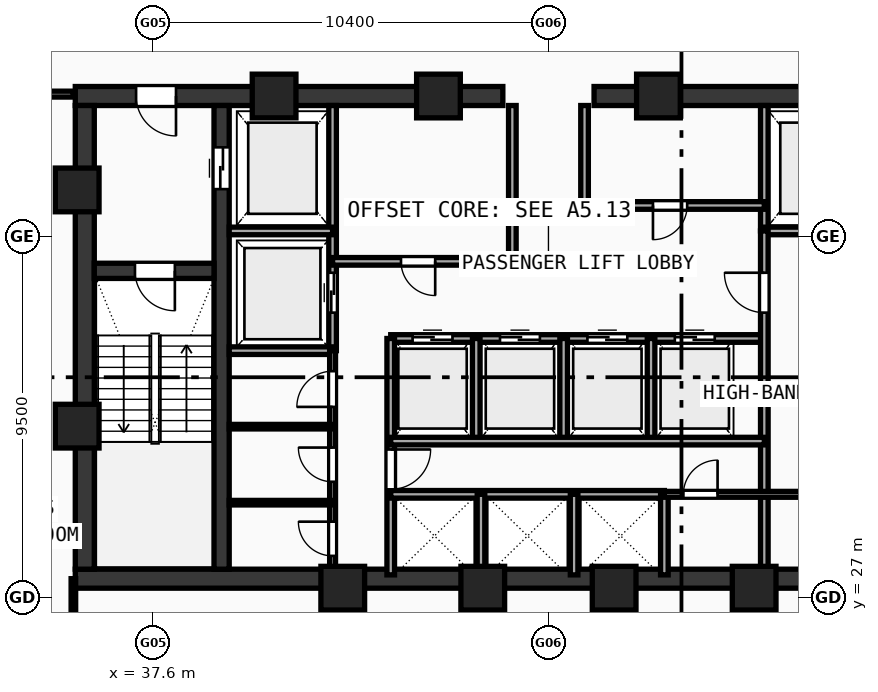
"""IFC4 building model, lengths in metres.
Left out: names, types, materials, properties, quantities, classifications, styles, units other than length and angle.
Written with IfcOpenShell. Run it as: python <this file> out.ifc"""

import sys

from ifc_helpers import new_model, si_unit, direction, frame, frame_2d, origin, origin_with_axes, origin_2d, place, context, subcontext, project, spatial, rectangle, hollow_rectangle, extrude, source, transform, mapped, element, fill, save


model = new_model("IFC4")
c1 = context("Model", 3, precision=1e-05, world=origin(), true_north=direction((0.0, 1.0)))
c2 = subcontext(c1, "Body", "Model", "MODEL_VIEW")
j1 = project(units=[si_unit("LENGTHUNIT", "METRE"), si_unit("PLANEANGLEUNIT", "RADIAN")], contexts=[c1])
p1 = place(None, origin())
s1 = spatial("IfcSite", under=j1, at=p1, CompositionType="ELEMENT")
p2 = place(p1, origin())
s2 = spatial("IfcBuilding", under=s1, at=p2, CompositionType="ELEMENT")
p3 = place(p2, frame((0.0, 0.0, 192.36)))
s3 = spatial("IfcBuildingStorey", under=s2, at=p3, CompositionType="ELEMENT", Elevation=192.36)
p4 = place(p3, frame((35.55, 27.5, 0.0), z_axis=(0.0, 0.0, 1.0), x_axis=(1.0, 0.0, 0.0)))
e1 = element("IfcWall", 1, at=p4, inside=s3, PredefinedType="SHEAR", context=c2, shape_type="SweptSolid", body=[
    extrude(rectangle(XDim=24.9, YDim=0.5, at=frame_2d((12.45, 0.0))), origin(), (0.0, 0.0, 1.0), 3.54),
])
p5 = place(p3, frame((35.55, 40.2, 0.0), z_axis=(0.0, 0.0, 1.0), x_axis=(1.0, 0.0, 0.0)))
e2 = element("IfcWall", 2, at=p5, inside=s3, PredefinedType="SHEAR", context=c2, shape_type="SweptSolid", body=[
    extrude(rectangle(XDim=11.25, YDim=0.5, at=frame_2d((5.625, 0.0))), origin(), (0.0, 0.0, 1.0), 3.54),
])
p6 = place(p5, frame((1.6, 0.0, 0.0)))
e3 = element("IfcOpeningElement", 3, at=p6, cuts=e2, PredefinedType="OPENING", context=c2, shape_type="SweptSolid", body=[
    extrude(rectangle(XDim=1.05, YDim=2.1, at=frame_2d((0.525, 1.05))), frame((0.0, 0.26, 0.0), z_axis=(0.0, -1.0, 0.0), x_axis=(1.0, 0.0, 0.0)), (0.0, 0.0, 1.0), 0.52),
])
p7 = place(p3, frame((49.2, 40.2, 0.0), z_axis=(0.0, 0.0, 1.0), x_axis=(1.0, 0.0, 0.0)))
e4 = element("IfcWall", 4, at=p7, inside=s3, PredefinedType="SHEAR", context=c2, shape_type="SweptSolid", body=[
    extrude(rectangle(XDim=11.25, YDim=0.5, at=frame_2d((5.625, 0.0))), origin(), (0.0, 0.0, 1.0), 3.54),
])
p8 = place(p7, frame((8.6, 0.0, 0.0)))
e5 = element("IfcOpeningElement", 5, at=p8, cuts=e4, PredefinedType="OPENING", context=c2, shape_type="SweptSolid", body=[
    extrude(rectangle(XDim=1.05, YDim=2.1, at=frame_2d((0.525, 1.05))), frame((0.0, 0.26, 0.0), z_axis=(0.0, -1.0, 0.0), x_axis=(1.0, 0.0, 0.0)), (0.0, 0.0, 1.0), 0.52),
])
p9 = place(p3, frame((35.8, 27.75, 0.0), z_axis=(0.0, 0.0, 1.0), x_axis=(0.0, 1.0, 0.0)))
e6 = element("IfcWall", 6, at=p9, inside=s3, PredefinedType="SHEAR", context=c2, shape_type="SweptSolid", body=[
    extrude(rectangle(XDim=12.2, YDim=0.5, at=frame_2d((6.1, 0.0))), origin(), (0.0, 0.0, 1.0), 3.54),
])
p10 = place(p3, frame((39.4, 27.75, 0.0), z_axis=(0.0, 0.0, 1.0), x_axis=(0.0, 1.0, 0.0)))
e7 = element("IfcWall", 7, at=p10, inside=s3, PredefinedType="SHEAR", context=c2, shape_type="SweptSolid", body=[
    extrude(rectangle(XDim=12.2, YDim=0.4, at=frame_2d((6.1, 0.0))), origin(), (0.0, 0.0, 1.0), 3.54),
])
p11 = place(p10, frame((10.0, 0.0, 0.0)))
e8 = element("IfcOpeningElement", 8, at=p11, cuts=e7, PredefinedType="OPENING", context=c2, shape_type="SweptSolid", body=[
    extrude(rectangle(XDim=1.1, YDim=2.1, at=frame_2d((0.55, 1.05))), frame((0.0, 0.21, 0.0), z_axis=(0.0, -1.0, 0.0), x_axis=(1.0, 0.0, 0.0)), (0.0, 0.0, 1.0), 0.42),
])
p12 = place(p3, frame((36.05, 35.6, 0.0), z_axis=(0.0, 0.0, 1.0), x_axis=(1.0, 0.0, 0.0)))
e9 = element("IfcWall", 9, at=p12, inside=s3, PredefinedType="SHEAR", context=c2, shape_type="SweptSolid", body=[
    extrude(rectangle(XDim=3.15, YDim=0.4, at=frame_2d((1.575, 0.0))), origin(), (0.0, 0.0, 1.0), 3.54),
])
p13 = place(p12, frame((1.07, 0.0, 0.0)))
e10 = element("IfcOpeningElement", 10, at=p13, cuts=e9, PredefinedType="OPENING", context=c2, shape_type="SweptSolid", body=[
    extrude(rectangle(XDim=1.05, YDim=2.1, at=frame_2d((0.525, 1.05))), frame((0.0, 0.21, 0.0), z_axis=(0.0, -1.0, 0.0), x_axis=(1.0, 0.0, 0.0)), (0.0, 0.0, 1.0), 0.42),
])
m1 = source(origin(), c2, "Body", "SweptSolid", [
    extrude(hollow_rectangle(XDim=1.15, YDim=1.15, WallThickness=0.048, at=origin_2d()), origin(), (0.0, 0.0, 1.0), 3.8),
])
for number, where, z_axis, x_axis in (
    (11, (42.588, 27.25, -0.26), (0.0, 0.0, 1.0), (1.0, 0.0, 0.0)),
    (12, (46.272, 27.25, -0.26), (0.0, 0.0, 1.0), (1.0, 0.0, 0.0)),
    (13, (49.729, 27.25, -0.26), (0.0, 0.0, 1.0), (1.0, 0.0, 0.0)),
    (14, (53.412, 27.25, -0.26), (0.0, 0.0, 1.0), (1.0, 0.0, 0.0)),
    (15, (50.894, 40.2, -0.26), (0.0, 0.0, 1.0), (1.0, 0.0, 0.0)),
    (16, (45.106, 40.2, -0.26), (0.0, 0.0, 1.0), (1.0, 0.0, 0.0)),
    (17, (40.781, 40.2, -0.26), (0.0, 0.0, 1.0), (1.0, 0.0, 0.0)),
    (18, (35.6, 37.729, -0.26), (0.0, 0.0, 1.0), (1.0, 0.0, 0.0)),
    (19, (35.6, 31.513, -0.26), (0.0, 0.0, 1.0), (1.0, 0.0, 0.0)),
):
    element("IfcColumn", number, at=place(p3, frame(where, z_axis=z_axis, x_axis=x_axis)), inside=s3, PredefinedType="COLUMN", context=c2, shape_type="MappedRepresentation", body=[
        mapped(m1, transform((0.0, 0.0, 0.0), scale=1.0)),
    ])
p14 = place(p3, frame((42.32, 33.5, 0.0), z_axis=(0.0, 0.0, 1.0), x_axis=(0.0, 1.0, 0.0)))
e20 = element("IfcWall", 20, at=p14, inside=s3, PredefinedType="SOLIDWALL", context=c2, shape_type="SweptSolid", body=[
    extrude(rectangle(XDim=6.45, YDim=0.2, at=frame_2d((3.225, 0.0))), origin(), (0.0, 0.0, 1.0), 3.54),
])
p15 = place(p14, frame((1.0, 0.0, 0.0)))
e21 = element("IfcOpeningElement", 21, at=p15, cuts=e20, PredefinedType="OPENING", context=c2, shape_type="SweptSolid", body=[
    extrude(rectangle(XDim=1.05, YDim=2.1, at=frame_2d((0.525, 1.05))), frame((0.0, 0.11, 0.0), z_axis=(0.0, -1.0, 0.0), x_axis=(1.0, 0.0, 0.0)), (0.0, 0.0, 1.0), 0.22),
])
for number, where, z_axis, x_axis in (
    (22, (39.6, 36.65, 0.0), (0.0, 0.0, 1.0), (1.0, 0.0, 0.0)),
    (23, (39.6, 33.5, 0.0), (0.0, 0.0, 1.0), (1.0, 0.0, 0.0)),
):
    element("IfcWall", number, at=place(p3, frame(where, z_axis=z_axis, x_axis=x_axis)), inside=s3, PredefinedType="SOLIDWALL", context=c2, shape_type="SweptSolid", body=[
        extrude(rectangle(XDim=2.72, YDim=0.2, at=frame_2d((1.36, 0.0))), origin(), (0.0, 0.0, 1.0), 3.54),
    ])
p16 = place(p3, frame((53.68, 36.65, 0.0), z_axis=(0.0, 0.0, 1.0), x_axis=(0.0, 1.0, 0.0)))
e24 = element("IfcWall", 24, at=p16, inside=s3, PredefinedType="SOLIDWALL", context=c2, shape_type="SweptSolid", body=[
    extrude(rectangle(XDim=3.3, YDim=0.2, at=frame_2d((1.65, 0.0))), origin(), (0.0, 0.0, 1.0), 3.54),
])
p17 = place(p3, frame((53.68, 36.65, 0.0), z_axis=(0.0, 0.0, 1.0), x_axis=(1.0, 0.0, 0.0)))
e25 = element("IfcWall", 25, at=p17, inside=s3, PredefinedType="SOLIDWALL", context=c2, shape_type="SweptSolid", body=[
    extrude(rectangle(XDim=2.72, YDim=0.2, at=frame_2d((1.36, 0.0))), origin(), (0.0, 0.0, 1.0), 3.54),
])
p18 = place(p3, frame((42.32, 35.85, 0.0), z_axis=(0.0, 0.0, 1.0), x_axis=(1.0, 0.0, 0.0)))
e26 = element("IfcWall", 26, at=p18, inside=s3, PredefinedType="SOLIDWALL", context=c2, shape_type="SweptSolid", body=[
    extrude(rectangle(XDim=4.73, YDim=0.2, at=frame_2d((2.365, 0.0))), origin(), (0.0, 0.0, 1.0), 3.54),
])
p19 = place(p18, frame((1.8, 0.0, 0.0)))
e27 = element("IfcOpeningElement", 27, at=p19, cuts=e26, PredefinedType="OPENING", context=c2, shape_type="SweptSolid", body=[
    extrude(rectangle(XDim=0.9, YDim=2.1, at=frame_2d((0.45, 1.05))), frame((0.0, 0.11, 0.0), z_axis=(0.0, -1.0, 0.0), x_axis=(1.0, 0.0, 0.0)), (0.0, 0.0, 1.0), 0.22),
])
p20 = place(p3, frame((48.95, 37.32, 0.0), z_axis=(0.0, 0.0, 1.0), x_axis=(1.0, 0.0, 0.0)))
e28 = element("IfcWall", 28, at=p20, inside=s3, PredefinedType="SOLIDWALL", context=c2, shape_type="SweptSolid", body=[
    extrude(rectangle(XDim=4.73, YDim=0.2, at=frame_2d((2.365, 0.0))), origin(), (0.0, 0.0, 1.0), 3.54),
])
p21 = place(p20, frame((1.8, 0.0, 0.0)))
e29 = element("IfcOpeningElement", 29, at=p21, cuts=e28, PredefinedType="OPENING", context=c2, shape_type="SweptSolid", body=[
    extrude(rectangle(XDim=0.9, YDim=2.1, at=frame_2d((0.45, 1.05))), frame((0.0, 0.11, 0.0), z_axis=(0.0, -1.0, 0.0), x_axis=(1.0, 0.0, 0.0)), (0.0, 0.0, 1.0), 0.22),
])
p22 = place(p3, frame((47.05, 35.85, 0.0), z_axis=(0.0, 0.0, 1.0), x_axis=(0.0, 1.0, 0.0)))
e30 = element("IfcWall", 30, at=p22, inside=s3, PredefinedType="SOLIDWALL", context=c2, shape_type="SweptSolid", body=[
    extrude(rectangle(XDim=4.1, YDim=0.2, at=frame_2d((2.05, 0.0))), origin(), (0.0, 0.0, 1.0), 3.54),
])
p23 = place(p3, frame((48.95, 37.32, 0.0), z_axis=(0.0, 0.0, 1.0), x_axis=(0.0, 1.0, 0.0)))
e31 = element("IfcWall", 31, at=p23, inside=s3, PredefinedType="SOLIDWALL", context=c2, shape_type="SweptSolid", body=[
    extrude(rectangle(XDim=2.63, YDim=0.2, at=frame_2d((1.315, 0.0))), origin(), (0.0, 0.0, 1.0), 3.54),
])
p24 = place(p3, frame((43.85, 33.82, 0.0), z_axis=(0.0, 0.0, 1.0), x_axis=(1.0, 0.0, 0.0)))
e32 = element("IfcWall", 32, at=p24, inside=s3, PredefinedType="SOLIDWALL", context=c2, shape_type="SweptSolid", body=[
    extrude(rectangle(XDim=9.83, YDim=0.2, at=frame_2d((4.915, 0.0))), origin(), (0.0, 0.0, 1.0), 3.54),
])
p25 = place(p24, frame((0.575, 0.0, 0.0)))
e33 = element("IfcOpeningElement", 33, at=p25, cuts=e32, PredefinedType="OPENING", context=c2, shape_type="SweptSolid", body=[
    extrude(rectangle(XDim=1.05, YDim=2.1, at=frame_2d((0.525, 1.05))), frame((0.0, 0.11, 0.0), z_axis=(0.0, -1.0, 0.0), x_axis=(1.0, 0.0, 0.0)), (0.0, 0.0, 1.0), 0.22),
])
p26 = place(p24, frame((2.875, 0.0, 0.0)))
e34 = element("IfcOpeningElement", 34, at=p26, cuts=e32, PredefinedType="OPENING", context=c2, shape_type="SweptSolid", body=[
    extrude(rectangle(XDim=1.05, YDim=2.1, at=frame_2d((0.525, 1.05))), frame((0.0, 0.11, 0.0), z_axis=(0.0, -1.0, 0.0), x_axis=(1.0, 0.0, 0.0)), (0.0, 0.0, 1.0), 0.22),
])
p27 = place(p24, frame((5.175, 0.0, 0.0)))
e35 = element("IfcOpeningElement", 35, at=p27, cuts=e32, PredefinedType="OPENING", context=c2, shape_type="SweptSolid", body=[
    extrude(rectangle(XDim=1.05, YDim=2.1, at=frame_2d((0.525, 1.05))), frame((0.0, 0.11, 0.0), z_axis=(0.0, -1.0, 0.0), x_axis=(1.0, 0.0, 0.0)), (0.0, 0.0, 1.0), 0.22),
])
p28 = place(p24, frame((7.475, 0.0, 0.0)))
e36 = element("IfcOpeningElement", 36, at=p28, cuts=e32, PredefinedType="OPENING", context=c2, shape_type="SweptSolid", body=[
    extrude(rectangle(XDim=1.05, YDim=2.1, at=frame_2d((0.525, 1.05))), frame((0.0, 0.11, 0.0), z_axis=(0.0, -1.0, 0.0), x_axis=(1.0, 0.0, 0.0)), (0.0, 0.0, 1.0), 0.22),
])
p29 = place(p3, frame((43.85, 27.6, 0.0), z_axis=(0.0, 0.0, 1.0), x_axis=(0.0, 1.0, 0.0)))
e37 = element("IfcWall", 37, at=p29, inside=s3, PredefinedType="SOLIDWALL", context=c2, shape_type="SweptSolid", body=[
    extrude(rectangle(XDim=6.22, YDim=0.2, at=frame_2d((3.11, 0.0))), origin(), (0.0, 0.0, 1.0), 3.54),
])
p30 = place(p29, frame((2.25, 0.0, 0.0)))
e38 = element("IfcOpeningElement", 38, at=p30, cuts=e37, PredefinedType="OPENING", context=c2, shape_type="SweptSolid", body=[
    extrude(rectangle(XDim=1.05, YDim=2.1, at=frame_2d((0.525, 1.05))), frame((0.0, 0.11, 0.0), z_axis=(0.0, -1.0, 0.0), x_axis=(1.0, 0.0, 0.0)), (0.0, 0.0, 1.0), 0.22),
])
p31 = place(p3, frame((53.68, 27.6, 0.0), z_axis=(0.0, 0.0, 1.0), x_axis=(0.0, 1.0, 0.0)))
e39 = element("IfcWall", 39, at=p31, inside=s3, PredefinedType="SOLIDWALL", context=c2, shape_type="SweptSolid", body=[
    extrude(rectangle(XDim=9.05, YDim=0.2, at=frame_2d((4.525, 0.0))), origin(), (0.0, 0.0, 1.0), 3.54),
])
p32 = place(p31, frame((6.9, 0.0, 0.0)))
e40 = element("IfcOpeningElement", 40, at=p32, cuts=e39, PredefinedType="OPENING", context=c2, shape_type="SweptSolid", body=[
    extrude(rectangle(XDim=1.05, YDim=2.1, at=frame_2d((0.525, 1.05))), frame((0.0, 0.11, 0.0), z_axis=(0.0, -1.0, 0.0), x_axis=(1.0, 0.0, 0.0)), (0.0, 0.0, 1.0), 0.22),
])
for number, where, z_axis, x_axis in (
    (41, (46.1, 31.12, 0.0), (0.0, 0.0, 1.0), (0.0, 1.0, 0.0)),
    (42, (48.4, 31.12, 0.0), (0.0, 0.0, 1.0), (0.0, 1.0, 0.0)),
    (43, (50.7, 31.12, 0.0), (0.0, 0.0, 1.0), (0.0, 1.0, 0.0)),
):
    element("IfcWall", number, at=place(p3, frame(where, z_axis=z_axis, x_axis=x_axis)), inside=s3, PredefinedType="SOLIDWALL", context=c2, shape_type="SweptSolid", body=[
        extrude(rectangle(XDim=2.7, YDim=0.2, at=frame_2d((1.35, 0.0))), origin(), (0.0, 0.0, 1.0), 3.54),
    ])
p33 = place(p3, frame((43.85, 29.72, 0.0), z_axis=(0.0, 0.0, 1.0), x_axis=(1.0, 0.0, 0.0)))
e44 = element("IfcWall", 44, at=p33, inside=s3, PredefinedType="SOLIDWALL", context=c2, shape_type="SweptSolid", body=[
    extrude(rectangle(XDim=7.2, YDim=0.2, at=frame_2d((3.6, 0.0))), origin(), (0.0, 0.0, 1.0), 3.54),
])
p34 = place(p3, frame((51.05, 27.6, 0.0), z_axis=(0.0, 0.0, 1.0), x_axis=(0.0, 1.0, 0.0)))
e45 = element("IfcWall", 45, at=p34, inside=s3, PredefinedType="SOLIDWALL", context=c2, shape_type="SweptSolid", body=[
    extrude(rectangle(XDim=2.12, YDim=0.2, at=frame_2d((1.06, 0.0))), origin(), (0.0, 0.0, 1.0), 3.54),
])
p35 = place(p3, frame((43.85, 31.12, 0.0), z_axis=(0.0, 0.0, 1.0), x_axis=(1.0, 0.0, 0.0)))
e46 = element("IfcWall", 46, at=p35, inside=s3, PredefinedType="SOLIDWALL", context=c2, shape_type="SweptSolid", body=[
    extrude(rectangle(XDim=9.83, YDim=0.2, at=frame_2d((4.915, 0.0))), origin(), (0.0, 0.0, 1.0), 3.54),
])
for number, where, z_axis, x_axis in (
    (47, (46.225, 27.6, 0.0), (0.0, 0.0, 1.0), (0.0, 1.0, 0.0)),
    (48, (48.675, 27.6, 0.0), (0.0, 0.0, 1.0), (0.0, 1.0, 0.0)),
):
    element("IfcWall", number, at=place(p3, frame(where, z_axis=z_axis, x_axis=x_axis)), inside=s3, PredefinedType="SOLIDWALL", context=c2, shape_type="SweptSolid", body=[
        extrude(rectangle(XDim=2.12, YDim=0.2, at=frame_2d((1.06, 0.0))), origin(), (0.0, 0.0, 1.0), 3.54),
    ])
p36 = place(p3, frame((42.32, 27.6, 0.0), z_axis=(0.0, 0.0, 1.0), x_axis=(0.0, 1.0, 0.0)))
e49 = element("IfcWall", 49, at=p36, inside=s3, PredefinedType="PARTITIONING", context=c2, shape_type="SweptSolid", body=[
    extrude(rectangle(XDim=5.9, YDim=0.155, at=frame_2d((2.95, 0.0))), origin(), (0.0, 0.0, 1.0), 3.54),
])
p37 = place(p36, frame((0.5, 0.0, 0.0)))
e50 = element("IfcOpeningElement", 50, at=p37, cuts=e49, PredefinedType="OPENING", context=c2, shape_type="SweptSolid", body=[
    extrude(rectangle(XDim=0.9, YDim=2.1, at=frame_2d((0.45, 1.05))), frame((0.0, 0.087, 0.0), z_axis=(0.0, -1.0, 0.0), x_axis=(1.0, 0.0, 0.0)), (0.0, 0.0, 1.0), 0.175),
])
p38 = place(p36, frame((2.45, 0.0, 0.0)))
e51 = element("IfcOpeningElement", 51, at=p38, cuts=e49, PredefinedType="OPENING", context=c2, shape_type="SweptSolid", body=[
    extrude(rectangle(XDim=0.9, YDim=2.1, at=frame_2d((0.45, 1.05))), frame((0.0, 0.087, 0.0), z_axis=(0.0, -1.0, 0.0), x_axis=(1.0, 0.0, 0.0)), (0.0, 0.0, 1.0), 0.175),
])
p39 = place(p36, frame((4.42, 0.0, 0.0)))
e52 = element("IfcOpeningElement", 52, at=p39, cuts=e49, PredefinedType="OPENING", context=c2, shape_type="SweptSolid", body=[
    extrude(rectangle(XDim=0.94, YDim=2.1, at=frame_2d((0.47, 1.05))), frame((0.0, 0.087, 0.0), z_axis=(0.0, -1.0, 0.0), x_axis=(1.0, 0.0, 0.0)), (0.0, 0.0, 1.0), 0.175),
])
p40 = place(p3, frame((51.05, 29.72, 0.0), z_axis=(0.0, 0.0, 1.0), x_axis=(1.0, 0.0, 0.0)))
e53 = element("IfcWall", 53, at=p40, inside=s3, PredefinedType="PARTITIONING", context=c2, shape_type="SweptSolid", body=[
    extrude(rectangle(XDim=4.07, YDim=0.155, at=frame_2d((2.035, 0.0))), origin(), (0.0, 0.0, 1.0), 3.54),
])
p41 = place(p40, frame((0.5, 0.0, 0.0)))
e54 = element("IfcOpeningElement", 54, at=p41, cuts=e53, PredefinedType="OPENING", context=c2, shape_type="SweptSolid", body=[
    extrude(rectangle(XDim=0.9, YDim=2.1, at=frame_2d((0.45, 1.05))), frame((0.0, 0.087, 0.0), z_axis=(0.0, -1.0, 0.0), x_axis=(1.0, 0.0, 0.0)), (0.0, 0.0, 1.0), 0.175),
])
for number, where, z_axis, x_axis in (
    (55, (39.6, 29.5, 0.0), (0.0, 0.0, 1.0), (1.0, 0.0, 0.0)),
    (56, (39.6, 31.5, 0.0), (0.0, 0.0, 1.0), (1.0, 0.0, 0.0)),
):
    element("IfcWall", number, at=place(p3, frame(where, z_axis=z_axis, x_axis=x_axis)), inside=s3, PredefinedType="PARTITIONING", context=c2, shape_type="SweptSolid", body=[
        extrude(rectangle(XDim=2.72, YDim=0.12, at=frame_2d((1.36, 0.0))), origin(), (0.0, 0.0, 1.0), 3.54),
    ])
p42 = place(p3, frame((31.45, 40.25, 0.0), z_axis=(0.0, 0.0, 1.0), x_axis=(1.0, 0.0, 0.0)))
e57 = element("IfcWall", 57, at=p42, inside=s3, PredefinedType="PARTITIONING", context=c2, shape_type="SweptSolid", body=[
    extrude(rectangle(XDim=4.05, YDim=0.155, at=frame_2d((2.025, 0.0))), origin(), (0.0, 0.0, 1.0), 3.54),
])
p43 = place(p3, frame((35.5, 23.65, 0.0), z_axis=(0.0, 0.0, 1.0), x_axis=(0.0, 1.0, 0.0)))
e58 = element("IfcWall", 58, at=p43, inside=s3, PredefinedType="PARTITIONING", context=c2, shape_type="SweptSolid", body=[
    extrude(rectangle(XDim=3.85, YDim=0.12, at=frame_2d((1.925, 0.0))), origin(), (0.0, 0.0, 1.0), 3.14),
])
m2 = source(origin(), c2, "Body", "SweptSolid", [
    extrude(rectangle(XDim=1.05, YDim=2.1, at=frame_2d((0.525, 1.05))), frame((0.0, 0.025, 0.0), z_axis=(0.0, -1.0, 0.0), x_axis=(1.0, 0.0, 0.0)), (0.0, 0.0, 1.0), 0.05),
])
p44 = place(p13, frame((1.05, 0.0, 0.0), z_axis=(0.0, 0.0, 1.0), x_axis=(-1.0, 0.0, 0.0)))
e59 = element("IfcDoor", 59, at=p44, inside=s3, OperationType="SINGLE_SWING_LEFT", PredefinedType="DOOR", context=c2, shape_type="MappedRepresentation", body=[
    mapped(m2, transform((0.0, 0.0, 0.0), scale=1.0)),
])
fill(e10, e59)
p45 = place(p6, frame((1.05, 0.0, 0.0), z_axis=(0.0, 0.0, 1.0), x_axis=(-1.0, 0.0, 0.0)))
e60 = element("IfcDoor", 60, at=p45, inside=s3, OperationType="SINGLE_SWING_LEFT", PredefinedType="DOOR", context=c2, shape_type="MappedRepresentation", body=[
    mapped(m2, transform((0.0, 0.0, 0.0), scale=1.0)),
])
fill(e3, e60)
m3 = source(origin(), c2, "Body", "SweptSolid", [
    extrude(rectangle(XDim=1.1, YDim=2.1, at=frame_2d((0.55, 1.05))), frame((0.0, 0.025, 0.0), z_axis=(0.0, -1.0, 0.0), x_axis=(1.0, 0.0, 0.0)), (0.0, 0.0, 1.0), 0.05),
])
p46 = place(p11, frame((1.1, 0.0, 0.0), z_axis=(0.0, 0.0, 1.0), x_axis=(-1.0, 0.0, 0.0)))
e61 = element("IfcDoor", 61, at=p46, inside=s3, OperationType="DOUBLE_DOOR_SLIDING", PredefinedType="DOOR", context=c2, shape_type="MappedRepresentation", body=[
    mapped(m3, transform((0.0, 0.0, 0.0), scale=1.0)),
])
fill(e8, e61)
p47 = place(p15, origin_with_axes())
e62 = element("IfcDoor", 62, at=p47, inside=s3, OperationType="DOUBLE_DOOR_SLIDING", PredefinedType="DOOR", context=c2, shape_type="MappedRepresentation", body=[
    mapped(m2, transform((0.0, 0.0, 0.0), scale=1.0)),
])
fill(e21, e62)
m4 = source(origin(), c2, "Body", "SweptSolid", [
    extrude(rectangle(XDim=0.9, YDim=2.1, at=frame_2d((0.45, 1.05))), frame((0.0, 0.025, 0.0), z_axis=(0.0, -1.0, 0.0), x_axis=(1.0, 0.0, 0.0)), (0.0, 0.0, 1.0), 0.05),
])
p48 = place(p19, frame((0.9, 0.0, 0.0), z_axis=(0.0, 0.0, 1.0), x_axis=(-1.0, 0.0, 0.0)))
e63 = element("IfcDoor", 63, at=p48, inside=s3, OperationType="SINGLE_SWING_LEFT", PredefinedType="DOOR", context=c2, shape_type="MappedRepresentation", body=[
    mapped(m4, transform((0.0, 0.0, 0.0), scale=1.0)),
])
fill(e27, e63)
p49 = place(p21, frame((0.9, 0.0, 0.0), z_axis=(0.0, 0.0, 1.0), x_axis=(-1.0, 0.0, 0.0)))
e64 = element("IfcDoor", 64, at=p49, inside=s3, OperationType="SINGLE_SWING_RIGHT", PredefinedType="DOOR", context=c2, shape_type="MappedRepresentation", body=[
    mapped(m4, transform((0.0, 0.0, 0.0), scale=1.0)),
])
fill(e29, e64)
p50 = place(p25, origin_with_axes())
e65 = element("IfcDoor", 65, at=p50, inside=s3, OperationType="DOUBLE_DOOR_SLIDING", PredefinedType="DOOR", context=c2, shape_type="MappedRepresentation", body=[
    mapped(m2, transform((0.0, 0.0, 0.0), scale=1.0)),
])
fill(e33, e65)
p51 = place(p26, origin_with_axes())
e66 = element("IfcDoor", 66, at=p51, inside=s3, OperationType="DOUBLE_DOOR_SLIDING", PredefinedType="DOOR", context=c2, shape_type="MappedRepresentation", body=[
    mapped(m2, transform((0.0, 0.0, 0.0), scale=1.0)),
])
fill(e34, e66)
p52 = place(p27, origin_with_axes())
e67 = element("IfcDoor", 67, at=p52, inside=s3, OperationType="DOUBLE_DOOR_SLIDING", PredefinedType="DOOR", context=c2, shape_type="MappedRepresentation", body=[
    mapped(m2, transform((0.0, 0.0, 0.0), scale=1.0)),
])
fill(e35, e67)
p53 = place(p28, origin_with_axes())
e68 = element("IfcDoor", 68, at=p53, inside=s3, OperationType="DOUBLE_DOOR_SLIDING", PredefinedType="DOOR", context=c2, shape_type="MappedRepresentation", body=[
    mapped(m2, transform((0.0, 0.0, 0.0), scale=1.0)),
])
fill(e36, e68)
p54 = place(p30, frame((1.05, 0.0, 0.0), z_axis=(0.0, 0.0, 1.0), x_axis=(-1.0, 0.0, 0.0)))
e69 = element("IfcDoor", 69, at=p54, inside=s3, OperationType="SINGLE_SWING_LEFT", PredefinedType="DOOR", context=c2, shape_type="MappedRepresentation", body=[
    mapped(m2, transform((0.0, 0.0, 0.0), scale=1.0)),
])
fill(e38, e69)
p55 = place(p32, origin_with_axes())
e70 = element("IfcDoor", 70, at=p55, inside=s3, OperationType="SINGLE_SWING_RIGHT", PredefinedType="DOOR", context=c2, shape_type="MappedRepresentation", body=[
    mapped(m2, transform((0.0, 0.0, 0.0), scale=1.0)),
])
fill(e40, e70)
p56 = place(p37, origin_with_axes())
e71 = element("IfcDoor", 71, at=p56, inside=s3, OperationType="SINGLE_SWING_RIGHT", PredefinedType="DOOR", context=c2, shape_type="MappedRepresentation", body=[
    mapped(m4, transform((0.0, 0.0, 0.0), scale=1.0)),
])
fill(e50, e71)
p57 = place(p38, origin_with_axes())
e72 = element("IfcDoor", 72, at=p57, inside=s3, OperationType="SINGLE_SWING_RIGHT", PredefinedType="DOOR", context=c2, shape_type="MappedRepresentation", body=[
    mapped(m4, transform((0.0, 0.0, 0.0), scale=1.0)),
])
fill(e51, e72)
m5 = source(origin(), c2, "Body", "SweptSolid", [
    extrude(rectangle(XDim=0.94, YDim=2.1, at=frame_2d((0.47, 1.05))), frame((0.0, 0.025, 0.0), z_axis=(0.0, -1.0, 0.0), x_axis=(1.0, 0.0, 0.0)), (0.0, 0.0, 1.0), 0.05),
])
p58 = place(p39, origin_with_axes())
e73 = element("IfcDoor", 73, at=p58, inside=s3, OperationType="SINGLE_SWING_LEFT", PredefinedType="DOOR", context=c2, shape_type="MappedRepresentation", body=[
    mapped(m5, transform((0.0, 0.0, 0.0), scale=1.0)),
])
fill(e52, e73)
p59 = place(p41, origin_with_axes())
e74 = element("IfcDoor", 74, at=p59, inside=s3, OperationType="SINGLE_SWING_RIGHT", PredefinedType="DOOR", context=c2, shape_type="MappedRepresentation", body=[
    mapped(m4, transform((0.0, 0.0, 0.0), scale=1.0)),
])
fill(e54, e74)
save(model, sys.argv[1])
